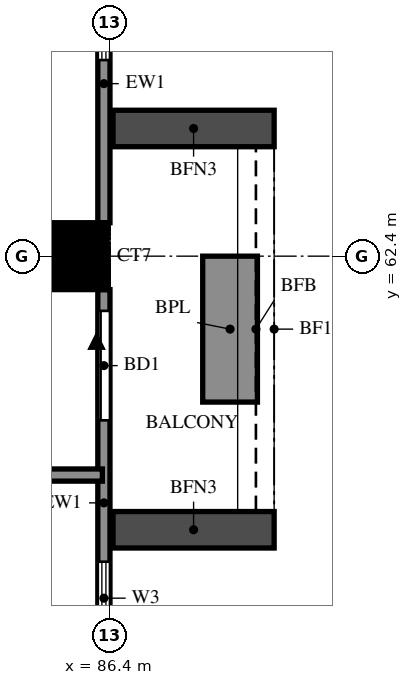
"""IFC4 building model, lengths in metres.
Left out: names, types, materials, properties, quantities, classifications, styles, units other than length and angle.
Written with IfcOpenShell. Run it as: python <this file> out.ifc"""

import sys

from ifc_helpers import new_model, si_unit, direction, frame, frame_2d, origin, origin_2d, place, context, subcontext, project, spatial, rectangle, extrude, source, transform, mapped, element, fill, save


model = new_model("IFC4")
c1 = context("Model", 3, precision=1e-05, world=origin(), true_north=direction((0.0, 1.0)))
c2 = subcontext(c1, "Body", "Model", "MODEL_VIEW")
j1 = project(units=[si_unit("LENGTHUNIT", "METRE"), si_unit("PLANEANGLEUNIT", "RADIAN")], contexts=[c1])
p1 = place(None, origin())
s1 = spatial("IfcSite", under=j1, at=p1, CompositionType="ELEMENT")
p2 = place(p1, origin())
s2 = spatial("IfcBuilding", under=s1, at=p2, CompositionType="ELEMENT")
p3 = place(p2, frame((0.0, 0.0, 55.0)))
s3 = spatial("IfcBuildingStorey", under=s2, at=p3, CompositionType="ELEMENT", Elevation=55.0)
m1 = source(origin(), c2, "Body", "SweptSolid", [
    extrude(rectangle(XDim=1.1, YDim=1.1, at=origin_2d()), origin(), (0.0, 0.0, 1.0), 3.18),
])
p4 = place(p3, frame((85.8, 62.4, 0.0), z_axis=(0.0, 0.0, 1.0), x_axis=(1.0, 0.0, 0.0)))
e1 = element("IfcColumn", 1, at=p4, inside=s3, PredefinedType="COLUMN", context=c2, shape_type="MappedRepresentation", body=[
    mapped(m1, transform((0.0, 0.0, 0.0))),
])
p5 = place(p3, frame((86.3, 55.75, 0.0), z_axis=(0.0, 0.0, 1.0), x_axis=(0.0, 1.0, 0.0)))
e2 = element("IfcWall", 2, at=p5, inside=s3, PredefinedType="SOLIDWALL", context=c2, shape_type="SweptSolid", body=[
    extrude(rectangle(XDim=6.1, YDim=0.2, at=frame_2d((3.05, 0.0))), origin(), (0.0, 0.0, 1.0), 3.18),
])
p6 = place(p5, frame((3.95, 0.0, 0.0)))
e3 = element("IfcOpeningElement", 3, at=p6, cuts=e2, PredefinedType="OPENING", context=c2, shape_type="SweptSolid", body=[
    extrude(rectangle(XDim=1.8, YDim=2.4, at=frame_2d((0.9, 1.2))), frame((0.0, 0.11, 0.0), z_axis=(0.0, -1.0, 0.0), x_axis=(1.0, 0.0, 0.0)), (0.0, 0.0, 1.0), 0.22),
])
p7 = place(p5, frame((0.425, 0.0, 0.6)))
e4 = element("IfcOpeningElement", 4, at=p7, cuts=e2, PredefinedType="OPENING", context=c2, shape_type="SweptSolid", body=[
    extrude(rectangle(XDim=1.2, YDim=2.4, at=frame_2d((0.6, 1.2))), frame((0.0, 0.11, 0.0), z_axis=(0.0, -1.0, 0.0), x_axis=(1.0, 0.0, 0.0)), (0.0, 0.0, 1.0), 0.22),
])
p8 = place(p3, frame((86.3, 62.95, 0.0), z_axis=(0.0, 0.0, 1.0), x_axis=(0.0, 1.0, 0.0)))
e5 = element("IfcWall", 5, at=p8, inside=s3, PredefinedType="SOLIDWALL", context=c2, shape_type="SweptSolid", body=[
    extrude(rectangle(XDim=6.1, YDim=0.2, at=frame_2d((3.05, 0.0))), origin(), (0.0, 0.0, 1.0), 3.18),
])
p9 = place(p8, frame((2.675, 0.0, 0.6)))
e6 = element("IfcOpeningElement", 6, at=p9, cuts=e5, PredefinedType="OPENING", context=c2, shape_type="SweptSolid", body=[
    extrude(rectangle(XDim=2.4, YDim=2.4, at=frame_2d((1.2, 1.2))), frame((0.0, 0.11, 0.0), z_axis=(0.0, -1.0, 0.0), x_axis=(1.0, 0.0, 0.0)), (0.0, 0.0, 1.0), 0.22),
])
for number, where, z_axis, x_axis in (
    (7, (86.45, 57.9, 0.0), (0.0, 0.0, 1.0), (1.0, 0.0, 0.0)),
    (8, (86.45, 64.5, 0.0), (0.0, 0.0, 1.0), (1.0, 0.0, 0.0)),
):
    element("IfcWall", number, at=place(p3, frame(where, z_axis=z_axis, x_axis=x_axis)), inside=s3, PredefinedType="SOLIDWALL", context=c2, shape_type="SweptSolid", body=[
        extrude(rectangle(XDim=2.65, YDim=0.6, at=frame_2d((1.325, 0.0))), origin(), (0.0, 0.0, 1.0), 2.85),
    ])
p10 = place(p3, frame((88.375, 60.0, 0.0), z_axis=(0.0, 0.0, 1.0), x_axis=(0.0, 1.0, 0.0)))
e9 = element("IfcWall", 9, at=p10, inside=s3, PredefinedType="SOLIDWALL", context=c2, shape_type="SweptSolid", body=[
    extrude(rectangle(XDim=2.4, YDim=0.9, at=frame_2d((1.2, 0.0))), origin(), (0.0, 0.0, 1.0), 0.9),
])
p11 = place(p3, frame((74.4, 58.8, 0.0), z_axis=(0.0, 0.0, 1.0), x_axis=(1.0, 0.0, 0.0)))
e10 = element("IfcWall", 10, at=p11, inside=s3, PredefinedType="SOLIDWALL", context=c2, shape_type="SweptSolid", body=[
    extrude(rectangle(XDim=11.875, YDim=0.2, at=frame_2d((5.938, 0.0))), origin(), (0.0, 0.0, 1.0), 2.28),
])
p12 = place(p3, frame((79.2, 62.4, 0.0), z_axis=(0.0, 0.0, 1.0), x_axis=(1.0, 0.0, 0.0)))
e11 = element("IfcWall", 11, at=p12, inside=s3, PredefinedType="PARTITIONING", context=c2, shape_type="SweptSolid", body=[
    extrude(rectangle(XDim=7.075, YDim=0.12, at=frame_2d((3.538, 0.0))), origin(), (0.0, 0.0, 1.0), 3.18),
])
p13 = place(p6, origin())
e12 = element("IfcDoor", 12, at=p13, inside=s3, OperationType="DOUBLE_DOOR_SLIDING", PredefinedType="DOOR", context=c2, shape_type="SweptSolid", body=[
    extrude(rectangle(XDim=1.8, YDim=2.4, at=frame_2d((0.9, 1.2))), frame((0.0, 0.025, 0.0), z_axis=(0.0, -1.0, 0.0), x_axis=(1.0, 0.0, 0.0)), (0.0, 0.0, 1.0), 0.05),
])
fill(e3, e12)
p14 = place(p7, origin())
e13 = element("IfcWindow", 13, at=p14, inside=s3, PartitioningType="SINGLE_PANEL", PredefinedType="WINDOW", context=c2, shape_type="SweptSolid", body=[
    extrude(rectangle(XDim=1.2, YDim=2.4, at=frame_2d((0.6, 1.2))), frame((0.0, 0.03, 0.0), z_axis=(0.0, -1.0, 0.0), x_axis=(1.0, 0.0, 0.0)), (0.0, 0.0, 1.0), 0.06),
])
fill(e4, e13)
p15 = place(p9, origin())
e14 = element("IfcWindow", 14, at=p15, inside=s3, PartitioningType="DOUBLE_PANEL_VERTICAL", PredefinedType="WINDOW", context=c2, shape_type="SweptSolid", body=[
    extrude(rectangle(XDim=2.4, YDim=2.4, at=frame_2d((1.2, 1.2))), frame((0.0, 0.03, 0.0), z_axis=(0.0, -1.0, 0.0), x_axis=(1.0, 0.0, 0.0)), (0.0, 0.0, 1.0), 0.06),
])
fill(e6, e14)
save(model, sys.argv[1])
